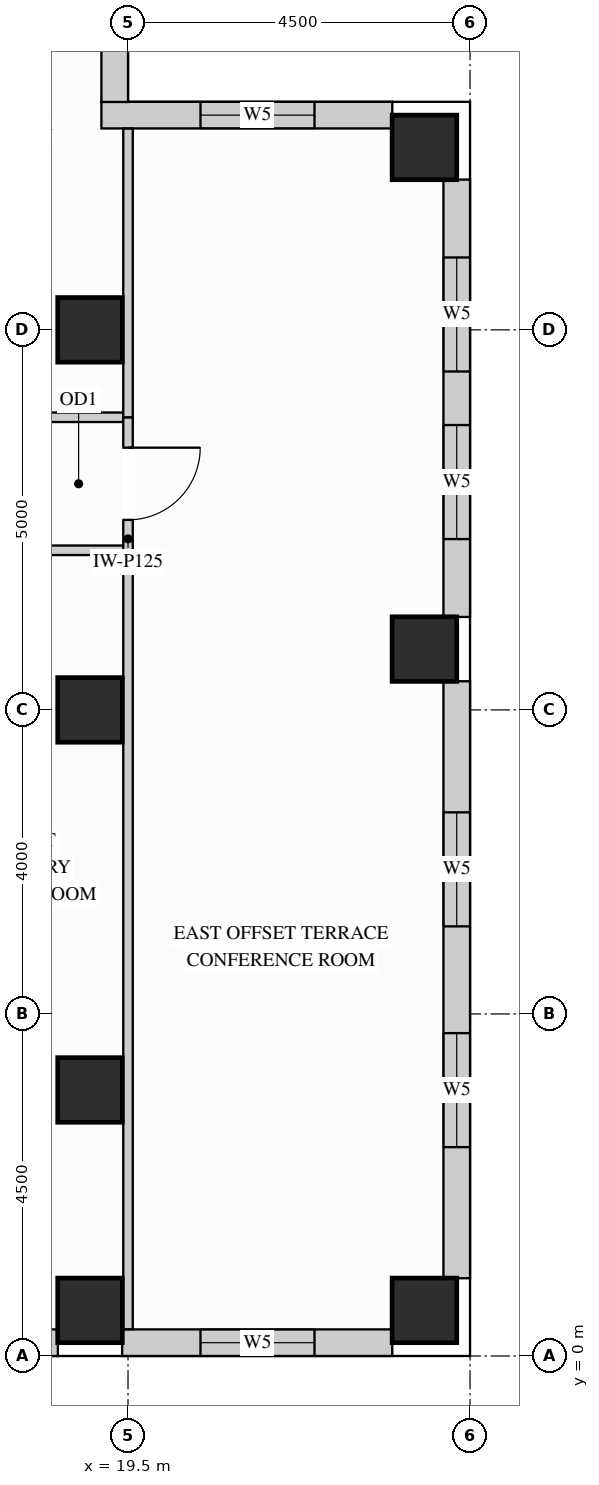
"""IFC4 building model, lengths in metres.
Left out: names, types, materials, properties, quantities, classifications, styles, units other than length and angle.
Written with IfcOpenShell. Run it as: python <this file> out.ifc"""

import sys

from ifc_helpers import new_model, si_unit, direction, frame, frame_2d, origin, origin_2d, place, context, subcontext, project, spatial, rectangle, extrude, source, transform, mapped, element, fill, save


model = new_model("IFC4")
c1 = context("Model", 3, precision=1e-05, world=origin(), true_north=direction((0.0, 1.0)))
c2 = subcontext(c1, "Body", "Model", "MODEL_VIEW")
j1 = project(units=[si_unit("LENGTHUNIT", "METRE"), si_unit("PLANEANGLEUNIT", "RADIAN")], contexts=[c1])
p1 = place(None, origin())
s1 = spatial("IfcSite", under=j1, at=p1, CompositionType="ELEMENT")
p2 = place(p1, origin())
s2 = spatial("IfcBuilding", under=s1, at=p2, CompositionType="ELEMENT")
p3 = place(p2, frame((0.0, 0.0, 270.0)))
s3 = spatial("IfcBuildingStorey", under=s2, at=p3, CompositionType="ELEMENT", Elevation=270.0)
m1 = source(origin(), c2, "Body", "SweptSolid", [
    extrude(rectangle(XDim=0.85, YDim=0.85, at=origin_2d()), origin(), (0.0, 0.0, 1.0), 3.4),
])
for number, where, z_axis, x_axis in (
    (1, (19.0, 13.5, 0.0), (0.0, 0.0, 1.0), (1.0, 0.0, 0.0)),
    (2, (19.0, 3.5, 0.0), (0.0, 0.0, 1.0), (1.0, 0.0, 0.0)),
    (3, (19.0, 8.5, 0.0), (0.0, 0.0, 1.0), (1.0, 0.0, 0.0)),
    (4, (19.0, 0.6, 0.0), (0.0, 0.0, 1.0), (1.0, 0.0, 0.0)),
    (5, (23.4, 0.6, 0.0), (0.0, 0.0, 1.0), (1.0, 0.0, 0.0)),
    (6, (23.4, 15.9, 0.0), (0.0, 0.0, 1.0), (1.0, 0.0, 0.0)),
    (7, (23.4, 9.3, 0.0), (0.0, 0.0, 1.0), (1.0, 0.0, 0.0)),
):
    element("IfcColumn", number, at=place(p3, frame(where, z_axis=z_axis, x_axis=x_axis)), inside=s3, PredefinedType="COLUMN", context=c2, shape_type="MappedRepresentation", body=[
        mapped(m1, transform((0.0, 0.0, 0.0), x_axis=(1.0, 0.0, 0.0), y_axis=(0.0, 1.0, 0.0), z_axis=(0.0, 0.0, 1.0))),
    ])
p4 = place(p3, frame((14.923, 0.175, 0.0), z_axis=(0.0, 0.0, 1.0), x_axis=(1.0, 0.0, 0.0)))
e8 = element("IfcWall", 8, at=p4, inside=s3, PredefinedType="SOLIDWALL", context=c2, shape_type="SweptSolid", body=[
    extrude(rectangle(XDim=3.654, YDim=0.35, at=frame_2d((1.827, 0.0))), origin(), (0.0, 0.0, 1.0), 3.385),
])
p5 = place(p4, frame((0.777, 0.0, 0.78)))
e9 = element("IfcOpeningElement", 9, at=p5, cuts=e8, PredefinedType="OPENING", context=c2, shape_type="SweptSolid", body=[
    extrude(rectangle(XDim=2.1, YDim=2.25, at=frame_2d((1.05, 1.125))), frame((0.0, 0.185, 0.0), z_axis=(0.0, -1.0, 0.0), x_axis=(1.0, 0.0, 0.0)), (0.0, 0.0, 1.0), 0.37),
])
p6 = place(p3, frame((19.423, 0.175, 0.0), z_axis=(0.0, 0.0, 1.0), x_axis=(1.0, 0.0, 0.0)))
e10 = element("IfcWall", 10, at=p6, inside=s3, PredefinedType="SOLIDWALL", context=c2, shape_type="SweptSolid", body=[
    extrude(rectangle(XDim=3.554, YDim=0.35, at=frame_2d((1.777, 0.0))), origin(), (0.0, 0.0, 1.0), 3.385),
])
p7 = place(p6, frame((1.031, 0.0, 0.78)))
e11 = element("IfcOpeningElement", 11, at=p7, cuts=e10, PredefinedType="OPENING", context=c2, shape_type="SweptSolid", body=[
    extrude(rectangle(XDim=1.5, YDim=2.0, at=frame_2d((0.75, 1.0))), frame((0.0, 0.185, 0.0), z_axis=(0.0, -1.0, 0.0), x_axis=(1.0, 0.0, 0.0)), (0.0, 0.0, 1.0), 0.37),
])
p8 = place(p3, frame((23.825, 1.023, 0.0), z_axis=(0.0, 0.0, 1.0), x_axis=(0.0, 1.0, 0.0)))
e12 = element("IfcWall", 12, at=p8, inside=s3, PredefinedType="SOLIDWALL", context=c2, shape_type="SweptSolid", body=[
    extrude(rectangle(XDim=7.854, YDim=0.35, at=frame_2d((3.927, 0.0))), origin(), (0.0, 0.0, 1.0), 3.385),
])
p9 = place(p8, frame((1.725, 0.0, 0.78)))
e13 = element("IfcOpeningElement", 13, at=p9, cuts=e12, PredefinedType="OPENING", context=c2, shape_type="SweptSolid", body=[
    extrude(rectangle(XDim=1.5, YDim=2.0, at=frame_2d((0.75, 1.0))), frame((0.0, 0.185, 0.0), z_axis=(0.0, -1.0, 0.0), x_axis=(1.0, 0.0, 0.0)), (0.0, 0.0, 1.0), 0.37),
])
p10 = place(p8, frame((4.629, 0.0, 0.78)))
e14 = element("IfcOpeningElement", 14, at=p10, cuts=e12, PredefinedType="OPENING", context=c2, shape_type="SweptSolid", body=[
    extrude(rectangle(XDim=1.5, YDim=2.0, at=frame_2d((0.75, 1.0))), frame((0.0, 0.185, 0.0), z_axis=(0.0, -1.0, 0.0), x_axis=(1.0, 0.0, 0.0)), (0.0, 0.0, 1.0), 0.37),
])
p11 = place(p3, frame((23.825, 9.723, 0.0), z_axis=(0.0, 0.0, 1.0), x_axis=(0.0, 1.0, 0.0)))
e15 = element("IfcWall", 15, at=p11, inside=s3, PredefinedType="SOLIDWALL", context=c2, shape_type="SweptSolid", body=[
    extrude(rectangle(XDim=5.754, YDim=0.35, at=frame_2d((2.877, 0.0))), origin(), (0.0, 0.0, 1.0), 3.385),
])
p12 = place(p11, frame((1.025, 0.0, 0.78)))
e16 = element("IfcOpeningElement", 16, at=p12, cuts=e15, PredefinedType="OPENING", context=c2, shape_type="SweptSolid", body=[
    extrude(rectangle(XDim=1.5, YDim=2.0, at=frame_2d((0.75, 1.0))), frame((0.0, 0.185, 0.0), z_axis=(0.0, -1.0, 0.0), x_axis=(1.0, 0.0, 0.0)), (0.0, 0.0, 1.0), 0.37),
])
p13 = place(p11, frame((3.229, 0.0, 0.78)))
e17 = element("IfcOpeningElement", 17, at=p13, cuts=e15, PredefinedType="OPENING", context=c2, shape_type="SweptSolid", body=[
    extrude(rectangle(XDim=1.5, YDim=2.0, at=frame_2d((0.75, 1.0))), frame((0.0, 0.185, 0.0), z_axis=(0.0, -1.0, 0.0), x_axis=(1.0, 0.0, 0.0)), (0.0, 0.0, 1.0), 0.37),
])
p14 = place(p3, frame((22.977, 16.325, 0.0), z_axis=(0.0, 0.0, 1.0), x_axis=(-1.0, 0.0, 0.0)))
e18 = element("IfcWall", 18, at=p14, inside=s3, PredefinedType="SOLIDWALL", context=c2, shape_type="SweptSolid", body=[
    extrude(rectangle(XDim=3.827, YDim=0.35, at=frame_2d((1.914, 0.0))), origin(), (0.0, 0.0, 1.0), 3.385),
])
p15 = place(p14, frame((1.023, 0.0, 0.78)))
e19 = element("IfcOpeningElement", 19, at=p15, cuts=e18, PredefinedType="OPENING", context=c2, shape_type="SweptSolid", body=[
    extrude(rectangle(XDim=1.5, YDim=2.0, at=frame_2d((0.75, 1.0))), frame((0.0, 0.185, 0.0), z_axis=(0.0, -1.0, 0.0), x_axis=(1.0, 0.0, 0.0)), (0.0, 0.0, 1.0), 0.37),
])
m2 = source(origin(), c2, "Body", "SweptSolid", [
    extrude(rectangle(XDim=1.079, YDim=0.35, at=frame_2d((0.54, 0.0))), origin(), (0.0, 0.0, 1.0), 2.619),
])
p16 = place(p3, frame((19.325, 16.498, 0.0), z_axis=(0.0, 0.0, 1.0), x_axis=(0.0, 1.0, 0.0)))
e20 = element("IfcWall", 20, at=p16, inside=s3, PredefinedType="SOLIDWALL", context=c2, shape_type="MappedRepresentation", body=[
    mapped(m2, transform((0.0, 0.0, 0.0), x_axis=(1.0, 0.0, 0.0), y_axis=(0.0, 1.0, 0.0), z_axis=(0.0, 0.0, 1.0))),
])
m3 = source(origin(), c2, "Body", "SweptSolid", [
    extrude(rectangle(XDim=3.15, YDim=0.125, at=frame_2d((1.575, 0.0))), origin(), (0.0, 0.0, 1.0), 3.385),
])
for number, where, z_axis, x_axis in (
    (21, (16.35, 12.35, 0.0), (0.0, 0.0, 1.0), (1.0, 0.0, 0.0)),
    (22, (16.35, 10.6, 0.0), (0.0, 0.0, 1.0), (1.0, 0.0, 0.0)),
):
    element("IfcWall", number, at=place(p3, frame(where, z_axis=z_axis, x_axis=x_axis)), inside=s3, PredefinedType="PARTITIONING", context=c2, shape_type="MappedRepresentation", body=[
        mapped(m3, transform((0.0, 0.0, 0.0), x_axis=(1.0, 0.0, 0.0), y_axis=(0.0, 1.0, 0.0), z_axis=(0.0, 0.0, 1.0))),
    ])
p17 = place(p3, frame((19.5, 10.6, 0.0), z_axis=(0.0, 0.0, 1.0), x_axis=(0.0, 1.0, 0.0)))
e23 = element("IfcWall", 23, at=p17, inside=s3, PredefinedType="PARTITIONING", context=c2, shape_type="SweptSolid", body=[
    extrude(rectangle(XDim=1.75, YDim=0.125, at=frame_2d((0.875, 0.0))), origin(), (0.0, 0.0, 1.0), 3.385),
])
p18 = place(p17, frame((0.4, 0.0, 0.0)))
e24 = element("IfcOpeningElement", 24, at=p18, cuts=e23, PredefinedType="OPENING", context=c2, shape_type="SweptSolid", body=[
    extrude(rectangle(XDim=0.95, YDim=2.15, at=frame_2d((0.475, 1.075))), frame((0.0, 0.073, 0.0), z_axis=(0.0, -1.0, 0.0), x_axis=(1.0, 0.0, 0.0)), (0.0, 0.0, 1.0), 0.145),
])
m4 = source(origin(), c2, "Body", "SweptSolid", [
    extrude(rectangle(XDim=10.248, YDim=0.125, at=frame_2d((5.124, 0.0))), origin(), (0.0, 0.0, 1.0), 3.385),
])
p19 = place(p3, frame((19.5, 0.352, 0.0), z_axis=(0.0, 0.0, 1.0), x_axis=(0.0, 1.0, 0.0)))
e25 = element("IfcWall", 25, at=p19, inside=s3, PredefinedType="PARTITIONING", context=c2, shape_type="MappedRepresentation", body=[
    mapped(m4, transform((0.0, 0.0, 0.0), x_axis=(1.0, 0.0, 0.0), y_axis=(0.0, 1.0, 0.0), z_axis=(0.0, 0.0, 1.0))),
])
m5 = source(origin(), c2, "Body", "SweptSolid", [
    extrude(rectangle(XDim=3.798, YDim=0.125, at=frame_2d((1.899, 0.0))), origin(), (0.0, 0.0, 1.0), 3.385),
])
p20 = place(p3, frame((19.5, 12.35, 0.0), z_axis=(0.0, 0.0, 1.0), x_axis=(0.0, 1.0, 0.0)))
e26 = element("IfcWall", 26, at=p20, inside=s3, PredefinedType="PARTITIONING", context=c2, shape_type="MappedRepresentation", body=[
    mapped(m5, transform((0.0, 0.0, 0.0), x_axis=(1.0, 0.0, 0.0), y_axis=(0.0, 1.0, 0.0), z_axis=(0.0, 0.0, 1.0))),
])
m6 = source(origin(), c2, "Body", "SweptSolid", [
    extrude(rectangle(XDim=0.95, YDim=2.15, at=frame_2d((0.475, 1.075))), frame((0.0, 0.025, 0.0), z_axis=(0.0, -1.0, 0.0), x_axis=(1.0, 0.0, 0.0)), (0.0, 0.0, 1.0), 0.05),
])
p21 = place(p18, origin())
e27 = element("IfcDoor", 27, at=p21, inside=s3, OperationType="SINGLE_SWING_RIGHT", PredefinedType="DOOR", context=c2, shape_type="MappedRepresentation", body=[
    mapped(m6, transform((0.0, 0.0, 0.0), x_axis=(1.0, 0.0, 0.0), y_axis=(0.0, 1.0, 0.0), z_axis=(0.0, 0.0, 1.0))),
])
fill(e24, e27)
m7 = source(origin(), c2, "Body", "SweptSolid", [
    extrude(rectangle(XDim=1.5, YDim=2.0, at=frame_2d((0.75, 1.0))), frame((0.0, 0.03, 0.0), z_axis=(0.0, -1.0, 0.0), x_axis=(1.0, 0.0, 0.0)), (0.0, 0.0, 1.0), 0.06),
])
p22 = place(p7, origin())
e28 = element("IfcWindow", 28, at=p22, inside=s3, PartitioningType="SINGLE_PANEL", PredefinedType="WINDOW", context=c2, shape_type="MappedRepresentation", body=[
    mapped(m7, transform((0.0, 0.0, 0.0), x_axis=(1.0, 0.0, 0.0), y_axis=(0.0, 1.0, 0.0), z_axis=(0.0, 0.0, 1.0))),
])
fill(e11, e28)
p23 = place(p9, origin())
e29 = element("IfcWindow", 29, at=p23, inside=s3, PartitioningType="SINGLE_PANEL", PredefinedType="WINDOW", context=c2, shape_type="MappedRepresentation", body=[
    mapped(m7, transform((0.0, 0.0, 0.0), x_axis=(1.0, 0.0, 0.0), y_axis=(0.0, 1.0, 0.0), z_axis=(0.0, 0.0, 1.0))),
])
fill(e13, e29)
p24 = place(p10, origin())
e30 = element("IfcWindow", 30, at=p24, inside=s3, PartitioningType="SINGLE_PANEL", PredefinedType="WINDOW", context=c2, shape_type="MappedRepresentation", body=[
    mapped(m7, transform((0.0, 0.0, 0.0), x_axis=(1.0, 0.0, 0.0), y_axis=(0.0, 1.0, 0.0), z_axis=(0.0, 0.0, 1.0))),
])
fill(e14, e30)
p25 = place(p12, origin())
e31 = element("IfcWindow", 31, at=p25, inside=s3, PartitioningType="SINGLE_PANEL", PredefinedType="WINDOW", context=c2, shape_type="MappedRepresentation", body=[
    mapped(m7, transform((0.0, 0.0, 0.0), x_axis=(1.0, 0.0, 0.0), y_axis=(0.0, 1.0, 0.0), z_axis=(0.0, 0.0, 1.0))),
])
fill(e16, e31)
p26 = place(p13, origin())
e32 = element("IfcWindow", 32, at=p26, inside=s3, PartitioningType="SINGLE_PANEL", PredefinedType="WINDOW", context=c2, shape_type="MappedRepresentation", body=[
    mapped(m7, transform((0.0, 0.0, 0.0), x_axis=(1.0, 0.0, 0.0), y_axis=(0.0, 1.0, 0.0), z_axis=(0.0, 0.0, 1.0))),
])
fill(e17, e32)
p27 = place(p15, origin())
e33 = element("IfcWindow", 33, at=p27, inside=s3, PartitioningType="SINGLE_PANEL", PredefinedType="WINDOW", context=c2, shape_type="MappedRepresentation", body=[
    mapped(m7, transform((0.0, 0.0, 0.0), x_axis=(1.0, 0.0, 0.0), y_axis=(0.0, 1.0, 0.0), z_axis=(0.0, 0.0, 1.0))),
])
fill(e19, e33)
save(model, sys.argv[1])
